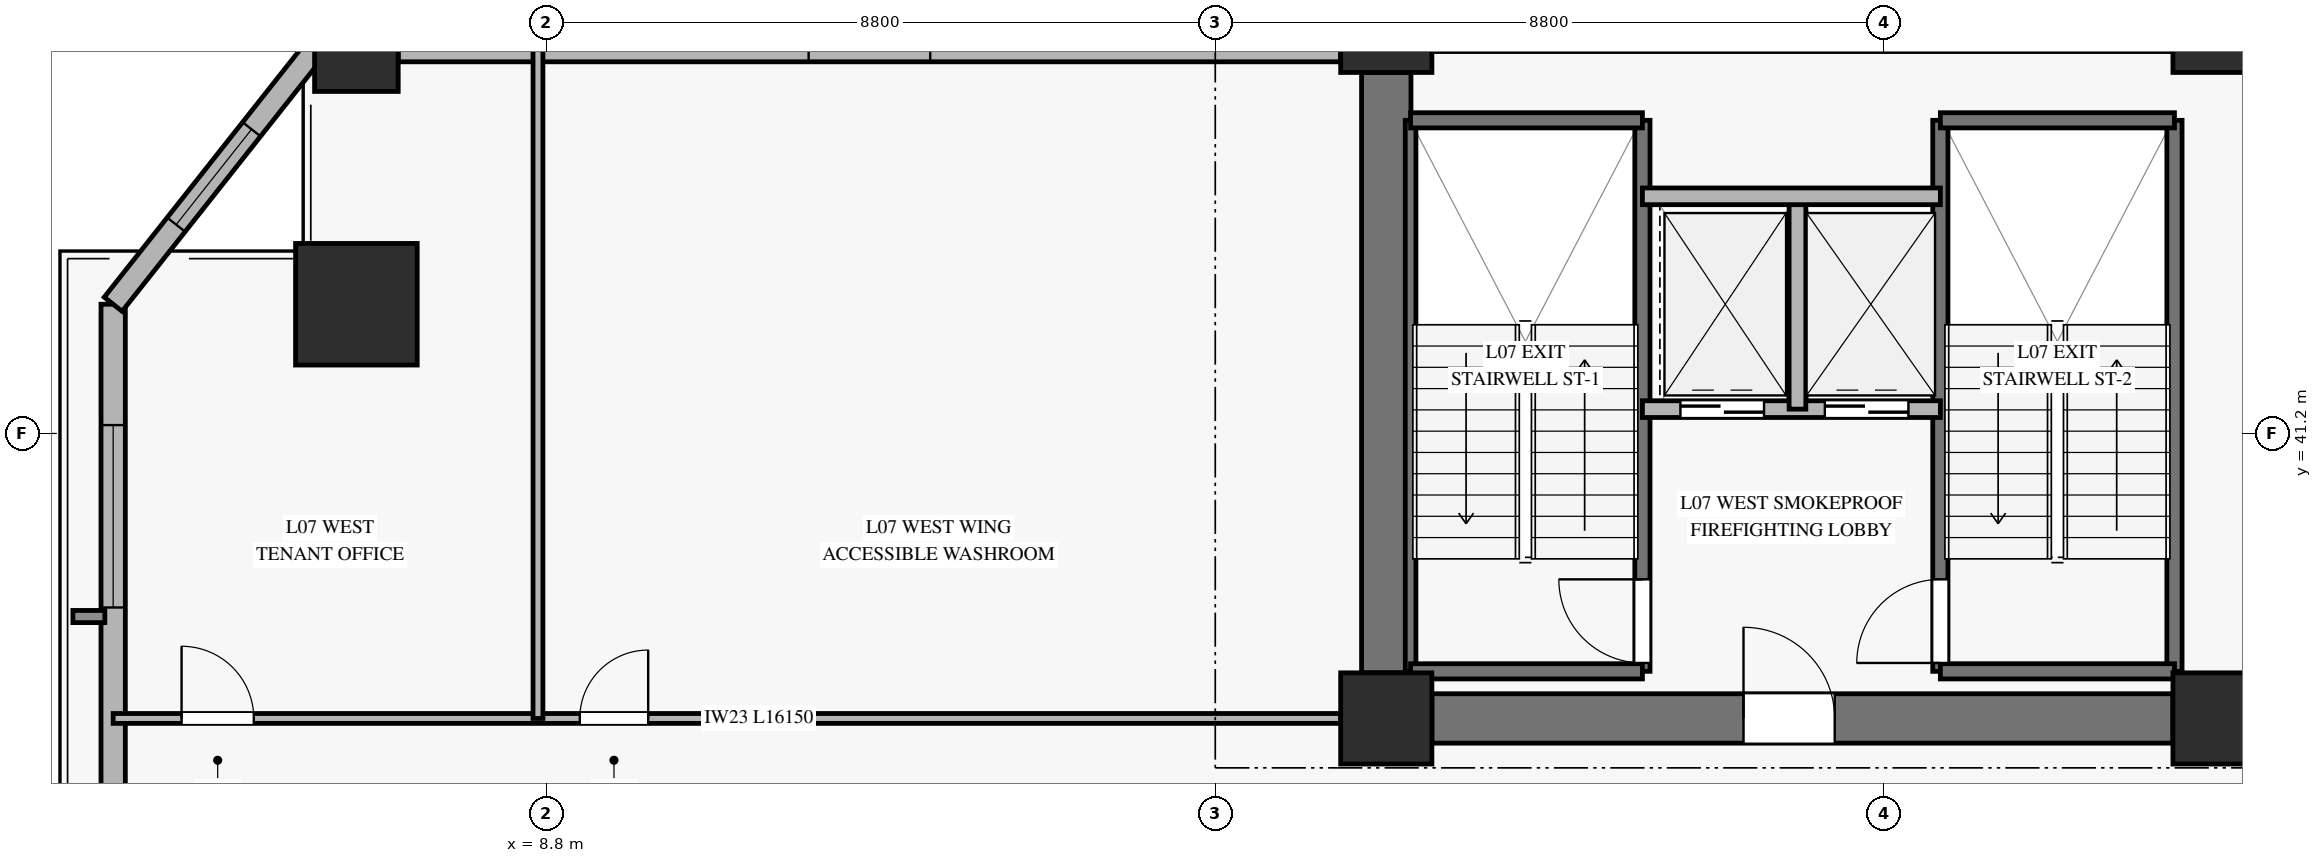
"""IFC4 building model, lengths in metres.
Left out: names, types, materials, properties, quantities, classifications, styles, units other than length and angle.
Written with IfcOpenShell. Run it as: python <this file> out.ifc"""

import sys

from ifc_helpers import new_model, si_unit, direction, frame, frame_2d, origin, origin_2d, place, context, subcontext, project, spatial, rectangle, hollow_rectangle, extrude, source, transform, mapped, element, fill, save


model = new_model("IFC4")
c1 = context("Model", 3, precision=1e-05, world=origin(), true_north=direction((0.0, 1.0)))
c2 = subcontext(c1, "Body", "Model", "MODEL_VIEW")
j1 = project(units=[si_unit("LENGTHUNIT", "METRE"), si_unit("PLANEANGLEUNIT", "RADIAN")], contexts=[c1])
p1 = place(None, origin())
s1 = spatial("IfcSite", under=j1, at=p1, CompositionType="ELEMENT")
p2 = place(p1, origin())
s2 = spatial("IfcBuilding", under=s1, at=p2, CompositionType="ELEMENT")
p3 = place(p2, frame((0.0, 0.0, 29.3)))
s3 = spatial("IfcBuildingStorey", under=s2, at=p3, CompositionType="ELEMENT", Elevation=29.3)
m1 = source(origin(), c2, "Body", "SweptSolid", [
    extrude(rectangle(XDim=1.2, YDim=1.2, at=origin_2d()), origin(), (0.0, 0.0, 1.0), 3.68),
])
for number, where, z_axis, x_axis in (
    (1, (19.85, 37.45, 0.0), (0.0, 0.0, 1.0), (1.0, 0.0, 0.0)),
    (2, (19.85, 46.55, 0.0), (0.0, 0.0, 1.0), (1.0, 0.0, 0.0)),
    (3, (30.8, 37.45, 0.0), (0.0, 0.0, 1.0), (1.0, 0.0, 0.0)),
    (4, (30.8, 46.55, 0.0), (0.0, 0.0, 1.0), (1.0, 0.0, 0.0)),
):
    element("IfcColumn", number, at=place(p3, frame(where, z_axis=z_axis, x_axis=x_axis)), inside=s3, PredefinedType="PILASTER", context=c2, shape_type="MappedRepresentation", body=[
        mapped(m1, transform((0.0, 0.0, 0.0), x_axis=(1.0, 0.0, 0.0), y_axis=(0.0, 1.0, 0.0), z_axis=(0.0, 0.0, 1.0), scale=1.0)),
    ])
p4 = place(p3, frame((20.45, 37.45, 0.0), z_axis=(0.0, 0.0, 1.0), x_axis=(1.0, 0.0, 0.0)))
e5 = element("IfcWall", 5, at=p4, inside=s3, PredefinedType="SHEAR", context=c2, shape_type="SweptSolid", body=[
    extrude(rectangle(XDim=9.75, YDim=0.65, at=frame_2d((4.875, 0.0))), origin(), (0.0, 0.0, 1.0), 3.68),
])
p5 = place(p4, frame((4.1, 0.0, 0.0)))
e6 = element("IfcOpeningElement", 6, at=p5, cuts=e5, PredefinedType="OPENING", context=c2, shape_type="SweptSolid", body=[
    extrude(rectangle(XDim=1.2, YDim=2.15, at=frame_2d((0.6, 1.075))), frame((0.0, 0.335, 0.0), z_axis=(0.0, -1.0, 0.0), x_axis=(1.0, 0.0, 0.0)), (0.0, 0.0, 1.0), 0.67),
])
p6 = place(p3, frame((19.85, 38.05, 0.0), z_axis=(0.0, 0.0, 1.0), x_axis=(0.0, 1.0, 0.0)))
e7 = element("IfcWall", 7, at=p6, inside=s3, PredefinedType="SHEAR", context=c2, shape_type="SweptSolid", body=[
    extrude(rectangle(XDim=7.9, YDim=0.65, at=frame_2d((3.95, 0.0))), origin(), (0.0, 0.0, 1.0), 3.68),
])
m2 = source(origin(), c2, "Body", "SweptSolid", [
    extrude(hollow_rectangle(XDim=1.6, YDim=1.6, WallThickness=0.075, at=origin_2d()), origin(), (0.0, 0.0, 1.0), 3.68),
])
p7 = place(p3, frame((6.3, 42.9, 0.0), z_axis=(0.0, 0.0, 1.0), x_axis=(1.0, 0.0, 0.0)))
e8 = element("IfcColumn", 8, at=p7, inside=s3, PredefinedType="COLUMN", context=c2, shape_type="MappedRepresentation", body=[
    mapped(m2, transform((0.0, 0.0, 0.0), x_axis=(1.0, 0.0, 0.0), y_axis=(0.0, 1.0, 0.0), z_axis=(0.0, 0.0, 1.0), scale=1.0)),
])
m3 = source(origin(), c2, "Body", "SweptSolid", [
    extrude(hollow_rectangle(XDim=1.1, YDim=1.1, WallThickness=0.05, at=origin_2d()), origin(), (0.0, 0.0, 1.0), 3.68),
])
p8 = place(p3, frame((6.3, 46.25, 0.0), z_axis=(0.0, 0.0, 1.0), x_axis=(1.0, 0.0, 0.0)))
e9 = element("IfcColumn", 9, at=p8, inside=s3, PredefinedType="COLUMN", context=c2, shape_type="MappedRepresentation", body=[
    mapped(m3, transform((0.0, 0.0, 0.0), x_axis=(1.0, 0.0, 0.0), y_axis=(0.0, 1.0, 0.0), z_axis=(0.0, 0.0, 1.0), scale=1.0)),
])
p9 = place(p3, frame((3.1, 25.25, 0.0), z_axis=(0.0, 0.0, 1.0), x_axis=(0.0, 1.0, 0.0)))
e10 = element("IfcWall", 10, at=p9, inside=s3, PredefinedType="SOLIDWALL", context=c2, shape_type="SweptSolid", body=[
    extrude(rectangle(XDim=17.65, YDim=0.32, at=frame_2d((8.825, 0.0))), origin(), (0.0, 0.0, 1.0), 3.16),
])
p10 = place(p9, frame((1.446, 0.0, 0.45)))
e11 = element("IfcOpeningElement", 11, at=p10, cuts=e10, PredefinedType="OPENING", context=c2, shape_type="SweptSolid", body=[
    extrude(rectangle(XDim=2.4, YDim=2.1, at=frame_2d((1.2, 1.05))), frame((0.0, 0.17, 0.0), z_axis=(0.0, -1.0, 0.0), x_axis=(1.0, 0.0, 0.0)), (0.0, 0.0, 1.0), 0.34),
])
p11 = place(p9, frame((13.66, 0.0, 0.45)))
e12 = element("IfcOpeningElement", 12, at=p11, cuts=e10, PredefinedType="OPENING", context=c2, shape_type="SweptSolid", body=[
    extrude(rectangle(XDim=2.4, YDim=2.1, at=frame_2d((1.2, 1.05))), frame((0.0, 0.17, 0.0), z_axis=(0.0, -1.0, 0.0), x_axis=(1.0, 0.0, 0.0)), (0.0, 0.0, 1.0), 0.34),
])
p12 = place(p3, frame((6.85, 46.25, 0.0), z_axis=(0.0, 0.0, 1.0), x_axis=(1.0, 0.0, 0.0)))
e13 = element("IfcWall", 13, at=p12, inside=s3, PredefinedType="SOLIDWALL", context=c2, shape_type="SweptSolid", body=[
    extrude(rectangle(XDim=12.4, YDim=0.32, at=frame_2d((6.2, 0.0))), origin(), (0.0, 0.0, 1.0), 3.16),
])
p13 = place(p12, frame((5.4, 0.0, 0.45)))
e14 = element("IfcOpeningElement", 14, at=p13, cuts=e13, PredefinedType="OPENING", context=c2, shape_type="SweptSolid", body=[
    extrude(rectangle(XDim=1.6, YDim=2.0, at=frame_2d((0.8, 1.0))), frame((0.0, 0.17, 0.0), z_axis=(0.0, -1.0, 0.0), x_axis=(1.0, 0.0, 0.0)), (0.0, 0.0, 1.0), 0.34),
])
p14 = place(p3, frame((5.75, 46.25, 0.0), z_axis=(0.0, 0.0, 1.0), x_axis=(-0.620377885234, -0.784303053361, 0.0)))
e15 = element("IfcWall", 15, at=p14, inside=s3, PredefinedType="SOLIDWALL", context=c2, shape_type="SweptSolid", body=[
    extrude(rectangle(XDim=4.271, YDim=0.3, at=frame_2d((2.136, 0.0))), origin(), (0.0, 0.0, 1.0), 3.16),
])
p15 = place(p14, frame((1.336, 0.0, 0.45)))
e16 = element("IfcOpeningElement", 16, at=p15, cuts=e15, PredefinedType="OPENING", context=c2, shape_type="SweptSolid", body=[
    extrude(rectangle(XDim=1.6, YDim=2.0, at=frame_2d((0.8, 1.0))), frame((0.0, 0.16, 0.0), z_axis=(0.0, -1.0, 0.0), x_axis=(1.0, 0.0, 0.0)), (0.0, 0.0, 1.0), 0.32),
])
p16 = place(p3, frame((20.17, 38.07, 0.0), z_axis=(0.0, 0.0, 1.0), x_axis=(0.0, 1.0, 0.0)))
e17 = element("IfcWall", 17, at=p16, inside=s3, PredefinedType="SOLIDWALL", context=c2, shape_type="SweptSolid", body=[
    extrude(rectangle(XDim=7.25, YDim=0.14, at=frame_2d((3.625, 0.0))), origin(), (0.0, 0.0, 1.0), 3.9),
])
p17 = place(p3, frame((23.22, 38.07, 0.0), z_axis=(0.0, 0.0, 1.0), x_axis=(0.0, 1.0, 0.0)))
e18 = element("IfcWall", 18, at=p17, inside=s3, PredefinedType="SOLIDWALL", context=c2, shape_type="SweptSolid", body=[
    extrude(rectangle(XDim=7.25, YDim=0.2, at=frame_2d((3.625, 0.0))), origin(), (0.0, 0.0, 1.0), 3.9),
])
p18 = place(p17, frame((0.11, 0.0, 0.0)))
e19 = element("IfcOpeningElement", 19, at=p18, cuts=e18, PredefinedType="OPENING", context=c2, shape_type="SweptSolid", body=[
    extrude(rectangle(XDim=1.1, YDim=2.15, at=frame_2d((0.55, 1.075))), frame((0.0, 0.11, 0.0), z_axis=(0.0, -1.0, 0.0), x_axis=(1.0, 0.0, 0.0)), (0.0, 0.0, 1.0), 0.22),
])
for number, where, z_axis, x_axis in (
    (20, (20.17, 45.32, 0.0), (0.0, 0.0, 1.0), (1.0, 0.0, 0.0)),
    (21, (20.17, 38.07, 0.0), (0.0, 0.0, 1.0), (1.0, 0.0, 0.0)),
):
    element("IfcWall", number, at=place(p3, frame(where, z_axis=z_axis, x_axis=x_axis)), inside=s3, PredefinedType="SOLIDWALL", context=c2, shape_type="SweptSolid", body=[
        extrude(rectangle(XDim=3.05, YDim=0.2, at=frame_2d((1.525, 0.0))), origin(), (0.0, 0.0, 1.0), 3.9),
    ])
p19 = place(p3, frame((27.14, 38.07, 0.0), z_axis=(0.0, 0.0, 1.0), x_axis=(0.0, 1.0, 0.0)))
e22 = element("IfcWall", 22, at=p19, inside=s3, PredefinedType="SOLIDWALL", context=c2, shape_type="SweptSolid", body=[
    extrude(rectangle(XDim=7.25, YDim=0.2, at=frame_2d((3.625, 0.0))), origin(), (0.0, 0.0, 1.0), 3.9),
])
p20 = place(p19, frame((0.11, 0.0, 0.0)))
e23 = element("IfcOpeningElement", 23, at=p20, cuts=e22, PredefinedType="OPENING", context=c2, shape_type="SweptSolid", body=[
    extrude(rectangle(XDim=1.1, YDim=2.15, at=frame_2d((0.55, 1.075))), frame((0.0, 0.11, 0.0), z_axis=(0.0, -1.0, 0.0), x_axis=(1.0, 0.0, 0.0)), (0.0, 0.0, 1.0), 0.22),
])
p21 = place(p3, frame((30.22, 38.07, 0.0), z_axis=(0.0, 0.0, 1.0), x_axis=(0.0, 1.0, 0.0)))
e24 = element("IfcWall", 24, at=p21, inside=s3, PredefinedType="SOLIDWALL", context=c2, shape_type="SweptSolid", body=[
    extrude(rectangle(XDim=7.25, YDim=0.2, at=frame_2d((3.625, 0.0))), origin(), (0.0, 0.0, 1.0), 3.9),
])
for number, where, z_axis, x_axis in (
    (25, (27.14, 45.32, 0.0), (0.0, 0.0, 1.0), (1.0, 0.0, 0.0)),
    (26, (27.14, 38.07, 0.0), (0.0, 0.0, 1.0), (1.0, 0.0, 0.0)),
):
    element("IfcWall", number, at=place(p3, frame(where, z_axis=z_axis, x_axis=x_axis)), inside=s3, PredefinedType="SOLIDWALL", context=c2, shape_type="SweptSolid", body=[
        extrude(rectangle(XDim=3.08, YDim=0.2, at=frame_2d((1.54, 0.0))), origin(), (0.0, 0.0, 1.0), 3.9),
    ])
p22 = place(p3, frame((23.22, 41.52, 0.0), z_axis=(0.0, 0.0, 1.0), x_axis=(1.0, 0.0, 0.0)))
e27 = element("IfcWall", 27, at=p22, inside=s3, PredefinedType="SOLIDWALL", context=c2, shape_type="SweptSolid", body=[
    extrude(rectangle(XDim=3.92, YDim=0.22, at=frame_2d((1.96, 0.0))), origin(), (0.0, 0.0, 1.0), 3.68),
])
p23 = place(p22, frame((0.5, 0.0, 0.0)))
e28 = element("IfcOpeningElement", 28, at=p23, cuts=e27, PredefinedType="OPENING", context=c2, shape_type="SweptSolid", body=[
    extrude(rectangle(XDim=1.1, YDim=2.2, at=frame_2d((0.55, 1.1))), frame((0.0, 0.12, 0.0), z_axis=(0.0, -1.0, 0.0), x_axis=(1.0, 0.0, 0.0)), (0.0, 0.0, 1.0), 0.24),
])
p24 = place(p22, frame((2.4, 0.0, 0.0)))
e29 = element("IfcOpeningElement", 29, at=p24, cuts=e27, PredefinedType="OPENING", context=c2, shape_type="SweptSolid", body=[
    extrude(rectangle(XDim=1.1, YDim=2.2, at=frame_2d((0.55, 1.1))), frame((0.0, 0.12, 0.0), z_axis=(0.0, -1.0, 0.0), x_axis=(1.0, 0.0, 0.0)), (0.0, 0.0, 1.0), 0.24),
])
p25 = place(p3, frame((25.26, 41.52, 0.0), z_axis=(0.0, 0.0, 1.0), x_axis=(0.0, 1.0, 0.0)))
e30 = element("IfcWall", 30, at=p25, inside=s3, PredefinedType="SOLIDWALL", context=c2, shape_type="SweptSolid", body=[
    extrude(rectangle(XDim=2.8, YDim=0.22, at=frame_2d((1.4, 0.0))), origin(), (0.0, 0.0, 1.0), 3.68),
])
p26 = place(p3, frame((23.22, 44.32, 0.0), z_axis=(0.0, 0.0, 1.0), x_axis=(1.0, 0.0, 0.0)))
e31 = element("IfcWall", 31, at=p26, inside=s3, PredefinedType="SOLIDWALL", context=c2, shape_type="SweptSolid", body=[
    extrude(rectangle(XDim=3.92, YDim=0.22, at=frame_2d((1.96, 0.0))), origin(), (0.0, 0.0, 1.0), 3.68),
])
p27 = place(p3, frame((3.1, 37.45, 0.0), z_axis=(0.0, 0.0, 1.0), x_axis=(1.0, 0.0, 0.0)))
e32 = element("IfcWall", 32, at=p27, inside=s3, PredefinedType="PARTITIONING", context=c2, shape_type="SweptSolid", body=[
    extrude(rectangle(XDim=16.15, YDim=0.13, at=frame_2d((8.075, 0.0))), origin(), (0.0, 0.0, 1.0), 3.165),
])
p28 = place(p27, frame((0.9, 0.0, 0.0)))
e33 = element("IfcOpeningElement", 33, at=p28, cuts=e32, PredefinedType="OPENING", context=c2, shape_type="SweptSolid", body=[
    extrude(rectangle(XDim=0.95, YDim=2.1, at=frame_2d((0.475, 1.05))), frame((0.0, 0.075, 0.0), z_axis=(0.0, -1.0, 0.0), x_axis=(1.0, 0.0, 0.0)), (0.0, 0.0, 1.0), 0.15),
])
p29 = place(p27, frame((6.139, 0.0, 0.0)))
e34 = element("IfcOpeningElement", 34, at=p29, cuts=e32, PredefinedType="OPENING", context=c2, shape_type="SweptSolid", body=[
    extrude(rectangle(XDim=0.9, YDim=2.1, at=frame_2d((0.45, 1.05))), frame((0.0, 0.075, 0.0), z_axis=(0.0, -1.0, 0.0), x_axis=(1.0, 0.0, 0.0)), (0.0, 0.0, 1.0), 0.15),
])
p30 = place(p3, frame((8.689, 37.45, 0.0), z_axis=(0.0, 0.0, 1.0), x_axis=(0.0, 1.0, 0.0)))
e35 = element("IfcWall", 35, at=p30, inside=s3, PredefinedType="PARTITIONING", context=c2, shape_type="SweptSolid", body=[
    extrude(rectangle(XDim=8.8, YDim=0.13, at=frame_2d((4.4, 0.0))), origin(), (0.0, 0.0, 1.0), 3.68),
])
m4 = source(origin(), c2, "Body", "SweptSolid", [
    extrude(rectangle(XDim=2.4, YDim=2.1, at=frame_2d((1.2, 1.05))), frame((0.0, 0.03, 0.0), z_axis=(0.0, -1.0, 0.0), x_axis=(1.0, 0.0, 0.0)), (0.0, 0.0, 1.0), 0.06),
])
p31 = place(p11, origin())
e36 = element("IfcWindow", 36, at=p31, inside=s3, PartitioningType="SINGLE_PANEL", PredefinedType="WINDOW", context=c2, shape_type="MappedRepresentation", body=[
    mapped(m4, transform((0.0, 0.0, 0.0), x_axis=(1.0, 0.0, 0.0), y_axis=(0.0, 1.0, 0.0), z_axis=(0.0, 0.0, 1.0), scale=1.0)),
])
fill(e12, e36)
m5 = source(origin(), c2, "Body", "SweptSolid", [
    extrude(rectangle(XDim=1.6, YDim=2.0, at=frame_2d((0.8, 1.0))), frame((0.0, 0.03, 0.0), z_axis=(0.0, -1.0, 0.0), x_axis=(1.0, 0.0, 0.0)), (0.0, 0.0, 1.0), 0.06),
])
p32 = place(p15, origin())
e37 = element("IfcWindow", 37, at=p32, inside=s3, PartitioningType="SINGLE_PANEL", PredefinedType="WINDOW", context=c2, shape_type="MappedRepresentation", body=[
    mapped(m5, transform((0.0, 0.0, 0.0), x_axis=(1.0, 0.0, 0.0), y_axis=(0.0, 1.0, 0.0), z_axis=(0.0, 0.0, 1.0), scale=1.0)),
])
fill(e16, e37)
m6 = source(origin(), c2, "Body", "SweptSolid", [
    extrude(rectangle(XDim=1.1, YDim=2.15, at=frame_2d((0.55, 1.075))), frame((0.0, 0.025, 0.0), z_axis=(0.0, -1.0, 0.0), x_axis=(1.0, 0.0, 0.0)), (0.0, 0.0, 1.0), 0.05),
])
p33 = place(p18, origin())
e38 = element("IfcDoor", 38, at=p33, inside=s3, OperationType="SINGLE_SWING_RIGHT", PredefinedType="DOOR", context=c2, shape_type="MappedRepresentation", body=[
    mapped(m6, transform((0.0, 0.0, 0.0), x_axis=(1.0, 0.0, 0.0), y_axis=(0.0, 1.0, 0.0), z_axis=(0.0, 0.0, 1.0), scale=1.0)),
])
fill(e19, e38)
p34 = place(p20, origin())
e39 = element("IfcDoor", 39, at=p34, inside=s3, OperationType="SINGLE_SWING_LEFT", PredefinedType="DOOR", context=c2, shape_type="MappedRepresentation", body=[
    mapped(m6, transform((0.0, 0.0, 0.0), x_axis=(1.0, 0.0, 0.0), y_axis=(0.0, 1.0, 0.0), z_axis=(0.0, 0.0, 1.0), scale=1.0)),
])
fill(e23, e39)
m7 = source(origin(), c2, "Body", "SweptSolid", [
    extrude(rectangle(XDim=1.1, YDim=2.2, at=frame_2d((0.55, 1.1))), frame((0.0, 0.025, 0.0), z_axis=(0.0, -1.0, 0.0), x_axis=(1.0, 0.0, 0.0)), (0.0, 0.0, 1.0), 0.05),
])
p35 = place(p23, origin())
e40 = element("IfcDoor", 40, at=p35, inside=s3, OperationType="SLIDING_TO_LEFT", PredefinedType="DOOR", context=c2, shape_type="MappedRepresentation", body=[
    mapped(m7, transform((0.0, 0.0, 0.0), x_axis=(1.0, 0.0, 0.0), y_axis=(0.0, 1.0, 0.0), z_axis=(0.0, 0.0, 1.0), scale=1.0)),
])
fill(e28, e40)
p36 = place(p24, origin())
e41 = element("IfcDoor", 41, at=p36, inside=s3, OperationType="SLIDING_TO_LEFT", PredefinedType="DOOR", context=c2, shape_type="MappedRepresentation", body=[
    mapped(m7, transform((0.0, 0.0, 0.0), x_axis=(1.0, 0.0, 0.0), y_axis=(0.0, 1.0, 0.0), z_axis=(0.0, 0.0, 1.0), scale=1.0)),
])
fill(e29, e41)
m8 = source(origin(), c2, "Body", "SweptSolid", [
    extrude(rectangle(XDim=1.2, YDim=2.15, at=frame_2d((0.6, 1.075))), frame((0.0, 0.025, 0.0), z_axis=(0.0, -1.0, 0.0), x_axis=(1.0, 0.0, 0.0)), (0.0, 0.0, 1.0), 0.05),
])
p37 = place(p5, origin())
e42 = element("IfcDoor", 42, at=p37, inside=s3, OperationType="SINGLE_SWING_LEFT", PredefinedType="DOOR", context=c2, shape_type="MappedRepresentation", body=[
    mapped(m8, transform((0.0, 0.0, 0.0), x_axis=(1.0, 0.0, 0.0), y_axis=(0.0, 1.0, 0.0), z_axis=(0.0, 0.0, 1.0), scale=1.0)),
])
fill(e6, e42)
m9 = source(origin(), c2, "Body", "SweptSolid", [
    extrude(rectangle(XDim=0.95, YDim=2.1, at=frame_2d((0.475, 1.05))), frame((0.0, 0.025, 0.0), z_axis=(0.0, -1.0, 0.0), x_axis=(1.0, 0.0, 0.0)), (0.0, 0.0, 1.0), 0.05),
])
p38 = place(p28, origin())
e43 = element("IfcDoor", 43, at=p38, inside=s3, OperationType="SINGLE_SWING_LEFT", PredefinedType="DOOR", context=c2, shape_type="MappedRepresentation", body=[
    mapped(m9, transform((0.0, 0.0, 0.0), x_axis=(1.0, 0.0, 0.0), y_axis=(0.0, 1.0, 0.0), z_axis=(0.0, 0.0, 1.0), scale=1.0)),
])
fill(e33, e43)
m10 = source(origin(), c2, "Body", "SweptSolid", [
    extrude(rectangle(XDim=0.9, YDim=2.1, at=frame_2d((0.45, 1.05))), frame((0.0, 0.025, 0.0), z_axis=(0.0, -1.0, 0.0), x_axis=(1.0, 0.0, 0.0)), (0.0, 0.0, 1.0), 0.05),
])
p39 = place(p29, origin())
e44 = element("IfcDoor", 44, at=p39, inside=s3, OperationType="SINGLE_SWING_RIGHT", PredefinedType="DOOR", context=c2, shape_type="MappedRepresentation", body=[
    mapped(m10, transform((0.0, 0.0, 0.0), x_axis=(1.0, 0.0, 0.0), y_axis=(0.0, 1.0, 0.0), z_axis=(0.0, 0.0, 1.0), scale=1.0)),
])
fill(e34, e44)
save(model, sys.argv[1])
